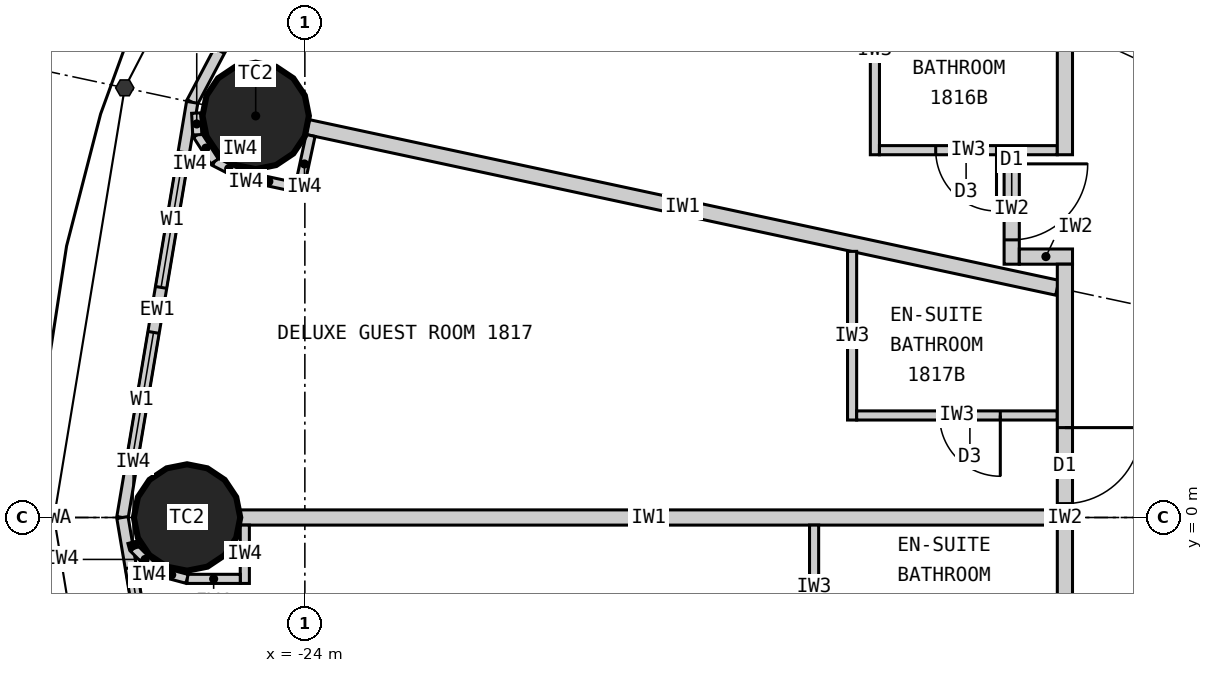
"""IFC4 building model, lengths in metres.
Left out: names, types, materials, properties, quantities, classifications, styles, units other than length and angle.
Written with IfcOpenShell. Run it as: python <this file> out.ifc"""

import sys

from ifc_helpers import new_model, si_unit, direction, frame, frame_2d, origin, origin_2d, place, context, subcontext, project, spatial, rectangle, circle, extrude, element, fill, save


model = new_model("IFC4")
c1 = context("Model", 3, precision=1e-05, world=origin(), true_north=direction((0.0, 1.0)))
c2 = subcontext(c1, "Body", "Model", "MODEL_VIEW")
j1 = project(units=[si_unit("LENGTHUNIT", "METRE"), si_unit("PLANEANGLEUNIT", "RADIAN")], contexts=[c1])
p1 = place(None, origin())
s1 = spatial("IfcSite", under=j1, at=p1, CompositionType="ELEMENT")
p2 = place(p1, origin())
s2 = spatial("IfcBuilding", under=s1, at=p2, CompositionType="ELEMENT")
p3 = place(p2, frame((0.0, 0.0, 73.8)))
s3 = spatial("IfcBuildingStorey", under=s2, at=p3, CompositionType="ELEMENT", Elevation=73.8)
for number, where, z_axis, x_axis in (
    (1, (-24.647, 5.283, 0.0), (0.0, 0.0, 1.0), (1.0, 0.0, 0.0)),
    (2, (-25.55, 0.0, 0.0), (0.0, 0.0, 1.0), (1.0, 0.0, 0.0)),
):
    element("IfcColumn", number, at=place(p3, frame(where, z_axis=z_axis, x_axis=x_axis)), inside=s3, PredefinedType="COLUMN", context=c2, shape_type="SweptSolid", body=[
        extrude(circle(Radius=0.7, at=origin_2d()), origin(), (0.0, 0.0, 1.0), 3.3),
    ])
p4 = place(p3, frame((-22.803, 10.532, 0.0), z_axis=(0.0, 0.0, 1.0), x_axis=(-0.467296867008, -0.884100468321, 0.0)))
e3 = element("IfcWall", 3, at=p4, inside=s3, PredefinedType="ELEMENTEDWALL", context=c2, shape_type="SweptSolid", body=[
    extrude(rectangle(XDim=5.734, YDim=0.15, at=frame_2d((2.867, 0.0))), origin(), (0.0, 0.0, 1.0), 3.12),
])
p5 = place(p4, frame((0.767, 0.0, 0.9)))
e4 = element("IfcOpeningElement", 4, at=p5, cuts=e3, PredefinedType="OPENING", context=c2, shape_type="SweptSolid", body=[
    extrude(rectangle(XDim=1.8, YDim=1.9, at=frame_2d((0.9, 0.95))), frame((0.0, 0.085, 0.0), z_axis=(0.0, -1.0, 0.0), x_axis=(1.0, 0.0, 0.0)), (0.0, 0.0, 1.0), 0.17),
])
p6 = place(p4, frame((3.167, 0.0, 0.9)))
e5 = element("IfcOpeningElement", 5, at=p6, cuts=e3, PredefinedType="OPENING", context=c2, shape_type="SweptSolid", body=[
    extrude(rectangle(XDim=1.8, YDim=1.9, at=frame_2d((0.9, 0.95))), frame((0.0, 0.085, 0.0), z_axis=(0.0, -1.0, 0.0), x_axis=(1.0, 0.0, 0.0)), (0.0, 0.0, 1.0), 0.17),
])
p7 = place(p3, frame((-25.482, 5.462, 0.0), z_axis=(0.0, 0.0, 1.0), x_axis=(-0.165642551694, -0.986185857264, 0.0)))
e6 = element("IfcWall", 6, at=p7, inside=s3, PredefinedType="ELEMENTEDWALL", context=c2, shape_type="SweptSolid", body=[
    extrude(rectangle(XDim=5.539, YDim=0.15, at=frame_2d((2.77, 0.0))), origin(), (0.0, 0.0, 1.0), 3.12),
])
p8 = place(p7, frame((0.669, 0.0, 0.9)))
e7 = element("IfcOpeningElement", 7, at=p8, cuts=e6, PredefinedType="OPENING", context=c2, shape_type="SweptSolid", body=[
    extrude(rectangle(XDim=1.8, YDim=1.9, at=frame_2d((0.9, 0.95))), frame((0.0, 0.085, 0.0), z_axis=(0.0, -1.0, 0.0), x_axis=(1.0, 0.0, 0.0)), (0.0, 0.0, 1.0), 0.17),
])
p9 = place(p7, frame((3.07, 0.0, 0.9)))
e8 = element("IfcOpeningElement", 8, at=p9, cuts=e6, PredefinedType="OPENING", context=c2, shape_type="SweptSolid", body=[
    extrude(rectangle(XDim=1.8, YDim=1.9, at=frame_2d((0.9, 0.95))), frame((0.0, 0.085, 0.0), z_axis=(0.0, -1.0, 0.0), x_axis=(1.0, 0.0, 0.0)), (0.0, 0.0, 1.0), 0.17),
])
p10 = place(p3, frame((-26.4, 0.0, 0.0), z_axis=(0.0, 0.0, 1.0), x_axis=(0.165642551694, -0.986185857264, 0.0)))
e9 = element("IfcWall", 9, at=p10, inside=s3, PredefinedType="ELEMENTEDWALL", context=c2, shape_type="SweptSolid", body=[
    extrude(rectangle(XDim=5.539, YDim=0.15, at=frame_2d((2.77, 0.0))), origin(), (0.0, 0.0, 1.0), 3.12),
])
p11 = place(p10, frame((0.669, 0.0, 0.9)))
e10 = element("IfcOpeningElement", 10, at=p11, cuts=e9, PredefinedType="OPENING", context=c2, shape_type="SweptSolid", body=[
    extrude(rectangle(XDim=1.8, YDim=1.9, at=frame_2d((0.9, 0.95))), frame((0.0, 0.085, 0.0), z_axis=(0.0, -1.0, 0.0), x_axis=(1.0, 0.0, 0.0)), (0.0, 0.0, 1.0), 0.17),
])
p12 = place(p10, frame((3.07, 0.0, 0.9)))
e11 = element("IfcOpeningElement", 11, at=p12, cuts=e9, PredefinedType="OPENING", context=c2, shape_type="SweptSolid", body=[
    extrude(rectangle(XDim=1.8, YDim=1.9, at=frame_2d((0.9, 0.95))), frame((0.0, 0.085, 0.0), z_axis=(0.0, -1.0, 0.0), x_axis=(1.0, 0.0, 0.0)), (0.0, 0.0, 1.0), 0.17),
])
p13 = place(p3, frame((-14.1, 3.022, 0.0), z_axis=(0.0, 0.0, 1.0), x_axis=(-0.977790014929, 0.209586943072, 0.0)))
e12 = element("IfcWall", 12, at=p13, inside=s3, PredefinedType="PARTITIONING", context=c2, shape_type="SweptSolid", body=[
    extrude(rectangle(XDim=10.087, YDim=0.2, at=frame_2d((5.043, 0.0))), origin(), (0.0, 0.0, 1.0), 2.32),
])
p14 = place(p3, frame((-14.1, 0.0, 0.0), z_axis=(0.0, 0.0, 1.0), x_axis=(-1.0, 0.0, 0.0)))
e13 = element("IfcWall", 13, at=p14, inside=s3, PredefinedType="PARTITIONING", context=c2, shape_type="SweptSolid", body=[
    extrude(rectangle(XDim=10.75, YDim=0.2, at=frame_2d((5.375, 0.0))), origin(), (0.0, 0.0, 1.0), 2.27),
])
p15 = place(p3, frame((-16.5, 7.521, 0.0), z_axis=(0.0, 0.0, 1.0), x_axis=(0.0, -1.0, 0.0)))
e14 = element("IfcWall", 14, at=p15, inside=s3, PredefinedType="PARTITIONING", context=c2, shape_type="SweptSolid", body=[
    extrude(rectangle(XDim=2.749, YDim=0.12, at=frame_2d((1.374, 0.0))), origin(), (0.0, 0.0, 1.0), 3.12),
])
p16 = place(p3, frame((-14.1, 4.833, 0.0), z_axis=(0.0, 0.0, 1.0), x_axis=(-1.0, 0.0, 0.0)))
e15 = element("IfcWall", 15, at=p16, inside=s3, PredefinedType="PARTITIONING", context=c2, shape_type="SweptSolid", body=[
    extrude(rectangle(XDim=2.34, YDim=0.12, at=frame_2d((1.17, 0.0))), origin(), (0.0, 0.0, 1.0), 3.12),
])
p17 = place(p16, frame((0.8, 0.0, 0.0)))
e16 = element("IfcOpeningElement", 16, at=p17, cuts=e15, PredefinedType="OPENING", context=c2, shape_type="SweptSolid", body=[
    extrude(rectangle(XDim=0.8, YDim=2.1, at=frame_2d((0.4, 1.05))), frame((0.0, 0.07, 0.0), z_axis=(0.0, -1.0, 0.0), x_axis=(1.0, 0.0, 0.0)), (0.0, 0.0, 1.0), 0.14),
])
p18 = place(p3, frame((-16.8, 3.501, 0.0), z_axis=(0.0, 0.0, 1.0), x_axis=(0.0, -1.0, 0.0)))
e17 = element("IfcWall", 17, at=p18, inside=s3, PredefinedType="PARTITIONING", context=c2, shape_type="SweptSolid", body=[
    extrude(rectangle(XDim=2.219, YDim=0.12, at=frame_2d((1.109, 0.0))), origin(), (0.0, 0.0, 1.0), 3.12),
])
p19 = place(p3, frame((-14.1, 1.343, 0.0), z_axis=(0.0, 0.0, 1.0), x_axis=(-1.0, 0.0, 0.0)))
e18 = element("IfcWall", 18, at=p19, inside=s3, PredefinedType="PARTITIONING", context=c2, shape_type="SweptSolid", body=[
    extrude(rectangle(XDim=2.64, YDim=0.12, at=frame_2d((1.32, 0.0))), origin(), (0.0, 0.0, 1.0), 3.12),
])
p20 = place(p19, frame((0.75, 0.0, 0.0)))
e19 = element("IfcOpeningElement", 19, at=p20, cuts=e18, PredefinedType="OPENING", context=c2, shape_type="SweptSolid", body=[
    extrude(rectangle(XDim=0.8, YDim=2.1, at=frame_2d((0.4, 1.05))), frame((0.0, 0.07, 0.0), z_axis=(0.0, -1.0, 0.0), x_axis=(1.0, 0.0, 0.0)), (0.0, 0.0, 1.0), 0.14),
])
p21 = place(p3, frame((-17.3, -0.1, 0.0), z_axis=(0.0, 0.0, 1.0), x_axis=(0.0, -1.0, 0.0)))
e20 = element("IfcWall", 20, at=p21, inside=s3, PredefinedType="PARTITIONING", context=c2, shape_type="SweptSolid", body=[
    extrude(rectangle(XDim=1.64, YDim=0.12, at=frame_2d((0.82, 0.0))), origin(), (0.0, 0.0, 1.0), 3.12),
])
p22 = place(p3, frame((-14.7, 4.772, 0.0), z_axis=(0.0, 0.0, 1.0), x_axis=(0.0, -1.0, 0.0)))
e21 = element("IfcWall", 21, at=p22, inside=s3, PredefinedType="PARTITIONING", context=c2, shape_type="SweptSolid", body=[
    extrude(rectangle(XDim=1.44, YDim=0.2, at=frame_2d((0.72, 0.0))), origin(), (0.0, 0.0, 1.0), 3.12),
])
p23 = place(p22, frame((0.12, 0.0, 0.0)))
e22 = element("IfcOpeningElement", 22, at=p23, cuts=e21, PredefinedType="OPENING", context=c2, shape_type="SweptSolid", body=[
    extrude(rectangle(XDim=1.0, YDim=2.2, at=frame_2d((0.5, 1.1))), frame((0.0, 0.11, 0.0), z_axis=(0.0, -1.0, 0.0), x_axis=(1.0, 0.0, 0.0)), (0.0, 0.0, 1.0), 0.22),
])
p24 = place(p3, frame((-13.9, 3.433, 0.0), z_axis=(0.0, 0.0, 1.0), x_axis=(-1.0, 0.0, 0.0)))
e23 = element("IfcWall", 23, at=p24, inside=s3, PredefinedType="PARTITIONING", context=c2, shape_type="SweptSolid", body=[
    extrude(rectangle(XDim=0.7, YDim=0.2, at=frame_2d((0.35, 0.0))), origin(), (0.0, 0.0, 1.0), 2.32),
])
p25 = place(p3, frame((-14.0, 9.9, 0.0), z_axis=(0.0, 0.0, 1.0), x_axis=(0.0, -1.0, 0.0)))
e24 = element("IfcWall", 24, at=p25, inside=s3, PredefinedType="PARTITIONING", context=c2, shape_type="SweptSolid", body=[
    extrude(rectangle(XDim=5.127, YDim=0.2, at=frame_2d((2.564, 0.0))), origin(), (0.0, 0.0, 1.0), 3.12),
])
p26 = place(p25, frame((0.103, 0.0, 0.0)))
e25 = element("IfcOpeningElement", 25, at=p26, cuts=e24, PredefinedType="OPENING", context=c2, shape_type="SweptSolid", body=[
    extrude(rectangle(XDim=1.0, YDim=2.2, at=frame_2d((0.5, 1.1))), frame((0.0, 0.11, 0.0), z_axis=(0.0, -1.0, 0.0), x_axis=(1.0, 0.0, 0.0)), (0.0, 0.0, 1.0), 0.22),
])
p27 = place(p3, frame((-14.0, 3.333, 0.0), z_axis=(0.0, 0.0, 1.0), x_axis=(0.0, -1.0, 0.0)))
e26 = element("IfcWall", 26, at=p27, inside=s3, PredefinedType="PARTITIONING", context=c2, shape_type="SweptSolid", body=[
    extrude(rectangle(XDim=6.665, YDim=0.2, at=frame_2d((3.333, 0.0))), origin(), (0.0, 0.0, 1.0), 3.12),
])
p28 = place(p27, frame((2.15, 0.0, 0.0)))
e27 = element("IfcOpeningElement", 27, at=p28, cuts=e26, PredefinedType="OPENING", context=c2, shape_type="SweptSolid", body=[
    extrude(rectangle(XDim=1.0, YDim=2.2, at=frame_2d((0.5, 1.1))), frame((0.0, 0.11, 0.0), z_axis=(0.0, -1.0, 0.0), x_axis=(1.0, 0.0, 0.0)), (0.0, 0.0, 1.0), 0.22),
])
p29 = place(p27, frame((5.173, 0.0, 0.0)))
e28 = element("IfcOpeningElement", 28, at=p29, cuts=e26, PredefinedType="OPENING", context=c2, shape_type="SweptSolid", body=[
    extrude(rectangle(XDim=1.0, YDim=2.2, at=frame_2d((0.5, 1.1))), frame((0.0, 0.11, 0.0), z_axis=(0.0, -1.0, 0.0), x_axis=(1.0, 0.0, 0.0)), (0.0, 0.0, 1.0), 0.22),
])
p30 = place(p3, frame((-23.925, 5.026, 0.0), z_axis=(0.0, 0.0, 1.0), x_axis=(-0.209681192172, -0.977769808109, 0.0)))
e29 = element("IfcWall", 29, at=p30, inside=s3, PredefinedType="PARTITIONING", context=c2, shape_type="SweptSolid", body=[
    extrude(rectangle(XDim=0.767, YDim=0.12, at=frame_2d((0.384, 0.0))), origin(), (0.0, 0.0, 1.0), 3.12),
])
p31 = place(p3, frame((-24.132, 4.347, 0.0), z_axis=(0.0, 0.0, 1.0), x_axis=(-0.977776882509, 0.209648200638, 0.0)))
e30 = element("IfcWall", 30, at=p31, inside=s3, PredefinedType="PARTITIONING", context=c2, shape_type="SweptSolid", body=[
    extrude(rectangle(XDim=0.7, YDim=0.12, at=frame_2d((0.35, 0.0))), origin(), (0.0, 0.0, 1.0), 3.12),
])
for number, where, z_axis, x_axis in (
    (31, (-24.816, 4.494, 0.0), (0.0, 0.0, 1.0), (-0.89, 0.455, 0.0)),
    (32, (-25.188, 4.684, 0.0), (0.0, 0.0, 1.0), (-0.543, 0.84, 0.0)),
):
    element("IfcWall", number, at=place(p3, frame(where, z_axis=z_axis, x_axis=x_axis)), inside=s3, PredefinedType="PARTITIONING", context=c2, shape_type="SweptSolid", body=[
        extrude(rectangle(XDim=0.418, YDim=0.12, at=frame_2d((0.209, 0.0))), origin(), (0.0, 0.0, 1.0), 3.12),
    ])
p32 = place(p3, frame((-25.416, 5.035, 0.0), z_axis=(0.0, 0.0, 1.0), x_axis=(-0.050406329159, 0.998728793007, 0.0)))
e33 = element("IfcWall", 33, at=p32, inside=s3, PredefinedType="PARTITIONING", context=c2, shape_type="SweptSolid", body=[
    extrude(rectangle(XDim=0.286, YDim=0.12, at=frame_2d((0.143, 0.0))), origin(), (0.0, 0.0, 1.0), 3.12),
])
p33 = place(p3, frame((-24.79, -0.1, 0.0), z_axis=(0.0, 0.0, 1.0), x_axis=(0.0, -1.0, 0.0)))
e34 = element("IfcWall", 34, at=p33, inside=s3, PredefinedType="PARTITIONING", context=c2, shape_type="SweptSolid", body=[
    extrude(rectangle(XDim=0.767, YDim=0.12, at=frame_2d((0.384, 0.0))), origin(), (0.0, 0.0, 1.0), 3.12),
])
p34 = place(p3, frame((-24.85, -0.808, 0.0), z_axis=(0.0, 0.0, 1.0), x_axis=(-1.0, 0.0, 0.0)))
e35 = element("IfcWall", 35, at=p34, inside=s3, PredefinedType="PARTITIONING", context=c2, shape_type="SweptSolid", body=[
    extrude(rectangle(XDim=0.7, YDim=0.12, at=frame_2d((0.35, 0.0))), origin(), (0.0, 0.0, 1.0), 3.12),
])
p35 = place(p3, frame((-25.55, -0.808, 0.0), z_axis=(0.0, 0.0, 1.0), x_axis=(-0.965807183573, 0.2592614205, 0.0)))
e36 = element("IfcWall", 36, at=p35, inside=s3, PredefinedType="PARTITIONING", context=c2, shape_type="SweptSolid", body=[
    extrude(rectangle(XDim=0.418, YDim=0.12, at=frame_2d((0.209, 0.0))), origin(), (0.0, 0.0, 1.0), 3.12),
])
p36 = place(p3, frame((-25.954, -0.699, 0.0), z_axis=(0.0, 0.0, 1.0), x_axis=(-0.707106781187, 0.707106781187, 0.0)))
e37 = element("IfcWall", 37, at=p36, inside=s3, PredefinedType="PARTITIONING", context=c2, shape_type="SweptSolid", body=[
    extrude(rectangle(XDim=0.418, YDim=0.12, at=frame_2d((0.209, 0.0))), origin(), (0.0, 0.0, 1.0), 3.12),
])
p37 = place(p3, frame((-26.249, -0.404, 0.0), z_axis=(0.0, 0.0, 1.0), x_axis=(-0.259754282609, 0.965674744759, 0.0)))
e38 = element("IfcWall", 38, at=p37, inside=s3, PredefinedType="PARTITIONING", context=c2, shape_type="SweptSolid", body=[
    extrude(rectangle(XDim=0.08, YDim=0.12, at=frame_2d((0.04, 0.0))), origin(), (0.0, 0.0, 1.0), 3.12),
])
p38 = place(p8, origin())
e39 = element("IfcWindow", 39, at=p38, inside=s3, PartitioningType="SINGLE_PANEL", PredefinedType="WINDOW", context=c2, shape_type="SweptSolid", body=[
    extrude(rectangle(XDim=1.8, YDim=1.9, at=frame_2d((0.9, 0.95))), frame((0.0, 0.03, 0.0), z_axis=(0.0, -1.0, 0.0), x_axis=(1.0, 0.0, 0.0)), (0.0, 0.0, 1.0), 0.06),
])
fill(e7, e39)
p39 = place(p9, origin())
e40 = element("IfcWindow", 40, at=p39, inside=s3, PartitioningType="SINGLE_PANEL", PredefinedType="WINDOW", context=c2, shape_type="SweptSolid", body=[
    extrude(rectangle(XDim=1.8, YDim=1.9, at=frame_2d((0.9, 0.95))), frame((0.0, 0.03, 0.0), z_axis=(0.0, -1.0, 0.0), x_axis=(1.0, 0.0, 0.0)), (0.0, 0.0, 1.0), 0.06),
])
fill(e8, e40)
p40 = place(p11, origin())
e41 = element("IfcWindow", 41, at=p40, inside=s3, PartitioningType="SINGLE_PANEL", PredefinedType="WINDOW", context=c2, shape_type="SweptSolid", body=[
    extrude(rectangle(XDim=1.8, YDim=1.9, at=frame_2d((0.9, 0.95))), frame((0.0, 0.03, 0.0), z_axis=(0.0, -1.0, 0.0), x_axis=(1.0, 0.0, 0.0)), (0.0, 0.0, 1.0), 0.06),
])
fill(e10, e41)
p41 = place(p17, origin())
e42 = element("IfcDoor", 42, at=p41, inside=s3, OperationType="SINGLE_SWING_LEFT", PredefinedType="DOOR", context=c2, shape_type="SweptSolid", body=[
    extrude(rectangle(XDim=0.8, YDim=2.1, at=frame_2d((0.4, 1.05))), frame((0.0, 0.025, 0.0), z_axis=(0.0, -1.0, 0.0), x_axis=(1.0, 0.0, 0.0)), (0.0, 0.0, 1.0), 0.05),
])
fill(e16, e42)
p42 = place(p23, origin())
e43 = element("IfcDoor", 43, at=p42, inside=s3, OperationType="SINGLE_SWING_LEFT", PredefinedType="DOOR", context=c2, shape_type="SweptSolid", body=[
    extrude(rectangle(XDim=1.0, YDim=2.2, at=frame_2d((0.5, 1.1))), frame((0.0, 0.025, 0.0), z_axis=(0.0, -1.0, 0.0), x_axis=(1.0, 0.0, 0.0)), (0.0, 0.0, 1.0), 0.05),
])
fill(e22, e43)
p43 = place(p20, origin())
e44 = element("IfcDoor", 44, at=p43, inside=s3, OperationType="SINGLE_SWING_LEFT", PredefinedType="DOOR", context=c2, shape_type="SweptSolid", body=[
    extrude(rectangle(XDim=0.8, YDim=2.1, at=frame_2d((0.4, 1.05))), frame((0.0, 0.025, 0.0), z_axis=(0.0, -1.0, 0.0), x_axis=(1.0, 0.0, 0.0)), (0.0, 0.0, 1.0), 0.05),
])
fill(e19, e44)
p44 = place(p28, origin())
e45 = element("IfcDoor", 45, at=p44, inside=s3, OperationType="SINGLE_SWING_LEFT", PredefinedType="DOOR", context=c2, shape_type="SweptSolid", body=[
    extrude(rectangle(XDim=1.0, YDim=2.2, at=frame_2d((0.5, 1.1))), frame((0.0, 0.025, 0.0), z_axis=(0.0, -1.0, 0.0), x_axis=(1.0, 0.0, 0.0)), (0.0, 0.0, 1.0), 0.05),
])
fill(e27, e45)
save(model, sys.argv[1])
